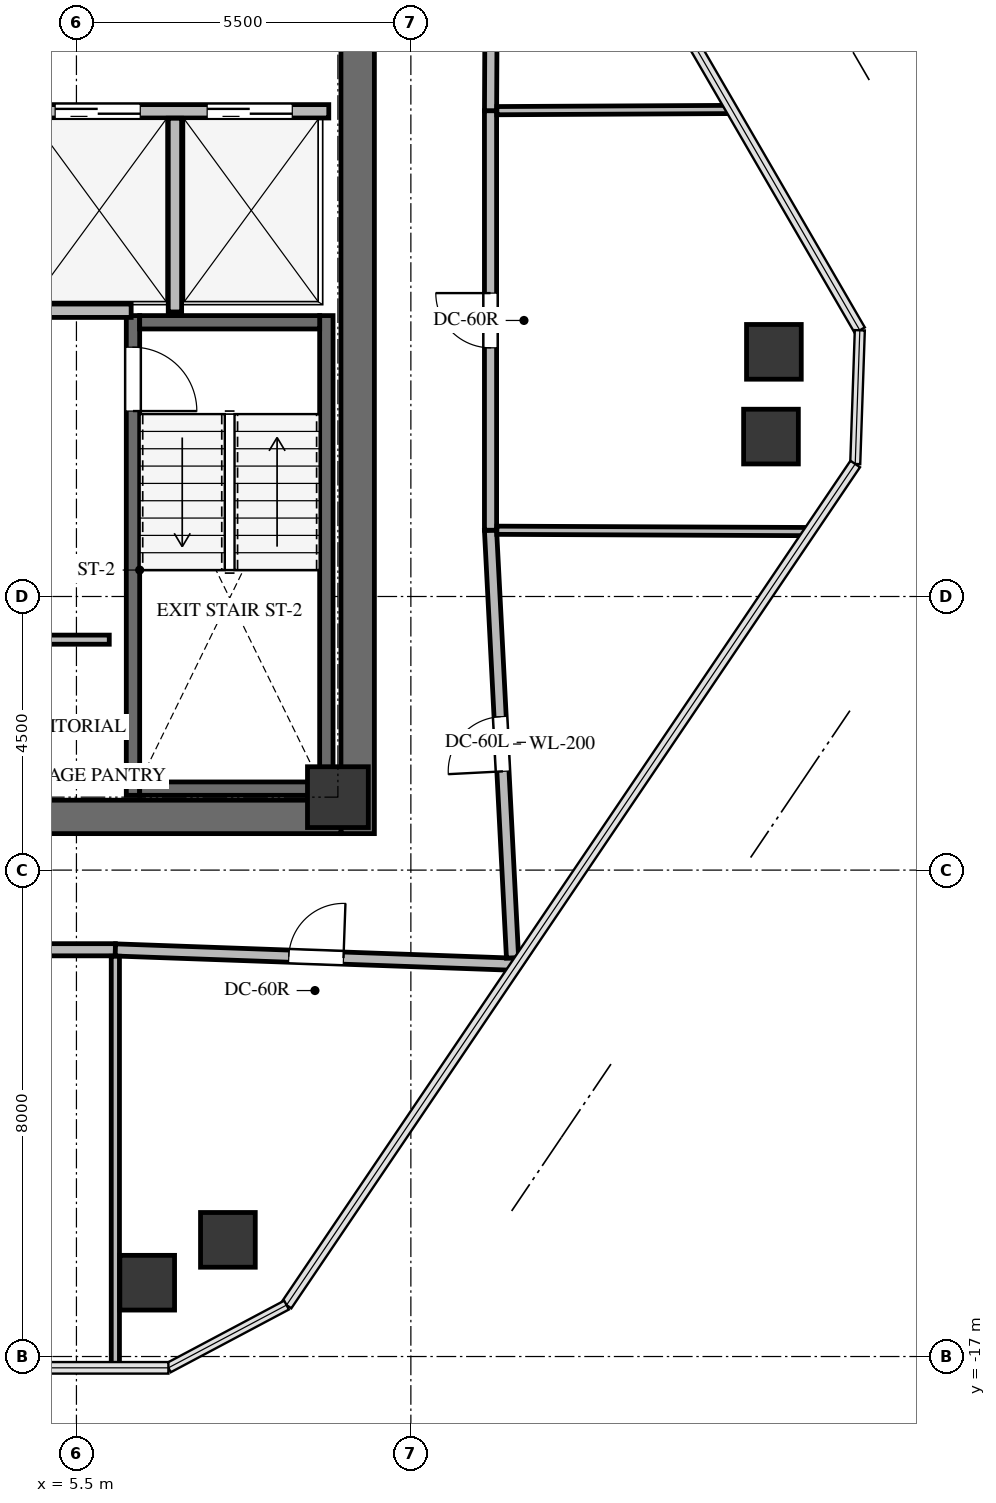
"""IFC4 building model, lengths in metres.
Left out: names, types, materials, properties, quantities, classifications, styles, units other than length and angle.
Written with IfcOpenShell. Run it as: python <this file> out.ifc"""

import sys

from ifc_helpers import new_model, si_unit, direction, frame, frame_2d, origin, origin_2d, place, context, subcontext, project, spatial, rectangle, extrude, source, transform, mapped, element, fill, save


model = new_model("IFC4")
c1 = context("Model", 3, precision=1e-05, world=origin(), true_north=direction((0.0, 1.0)))
c2 = subcontext(c1, "Body", "Model", "MODEL_VIEW")
j1 = project(units=[si_unit("LENGTHUNIT", "METRE"), si_unit("PLANEANGLEUNIT", "RADIAN")], contexts=[c1])
p1 = place(None, origin())
s1 = spatial("IfcSite", under=j1, at=p1, CompositionType="ELEMENT")
p2 = place(p1, origin())
s2 = spatial("IfcBuilding", under=s1, at=p2, CompositionType="ELEMENT")
p3 = place(p2, frame((0.0, 0.0, 264.9)))
s3 = spatial("IfcBuildingStorey", under=s2, at=p3, CompositionType="ELEMENT", Elevation=264.9)
p4 = place(p3, frame((10.125, -8.4, 0.0), z_axis=(0.0, 0.0, 1.0), x_axis=(0.0, 1.0, 0.0)))
e1 = element("IfcWall", 1, at=p4, inside=s3, PredefinedType="SHEAR", context=c2, shape_type="SweptSolid", body=[
    extrude(rectangle(XDim=16.8, YDim=0.55, at=frame_2d((8.4, 0.0))), origin(), (0.0, 0.0, 1.0), 3.4),
])
p5 = place(p3, frame((2.1, -8.125, 0.0), z_axis=(0.0, 0.0, 1.0), x_axis=(1.0, 0.0, 0.0)))
e2 = element("IfcWall", 2, at=p5, inside=s3, PredefinedType="SHEAR", context=c2, shape_type="SweptSolid", body=[
    extrude(rectangle(XDim=7.75, YDim=0.55, at=frame_2d((3.875, 0.0))), origin(), (0.0, 0.0, 1.0), 3.4),
])
p6 = place(p3, frame((9.61, -7.77, -0.3), z_axis=(0.0, 0.0, 1.0), x_axis=(0.0, 1.0, 0.0)))
e3 = element("IfcWall", 3, at=p6, inside=s3, PredefinedType="SHEAR", context=c2, shape_type="SweptSolid", body=[
    extrude(rectangle(XDim=7.89, YDim=0.22, at=frame_2d((3.945, 0.0))), origin(), (0.0, 0.0, 1.0), 3.4),
])
p7 = place(p3, frame((6.43, 0.12, -0.3), z_axis=(0.0, 0.0, 1.0), x_axis=(0.0, -1.0, 0.0)))
e4 = element("IfcWall", 4, at=p7, inside=s3, PredefinedType="SHEAR", context=c2, shape_type="SweptSolid", body=[
    extrude(rectangle(XDim=7.89, YDim=0.22, at=frame_2d((3.945, 0.0))), origin(), (0.0, 0.0, 1.0), 3.4),
])
p8 = place(p7, frame((0.52, 0.0, 0.0)))
e5 = element("IfcOpeningElement", 5, at=p8, cuts=e4, PredefinedType="OPENING", context=c2, shape_type="SweptSolid", body=[
    extrude(rectangle(XDim=1.05, YDim=2.15, at=frame_2d((0.525, 1.075))), frame((0.0, 0.12, 0.0), z_axis=(0.0, -1.0, 0.0), x_axis=(1.0, 0.0, 0.0)), (0.0, 0.0, 1.0), 0.24),
])
for number, where, z_axis, x_axis in (
    (6, (6.54, -7.66, -0.3), (0.0, 0.0, 1.0), (1.0, 0.0, 0.0)),
    (7, (9.5, 0.01, -0.3), (0.0, 0.0, 1.0), (-1.0, 0.0, 0.0)),
):
    element("IfcWall", number, at=place(p3, frame(where, z_axis=z_axis, x_axis=x_axis)), inside=s3, PredefinedType="SHEAR", context=c2, shape_type="SweptSolid", body=[
        extrude(rectangle(XDim=2.96, YDim=0.22, at=frame_2d((1.48, 0.0))), origin(), (0.0, 0.0, 1.0), 3.4),
    ])
m1 = source(origin(), c2, "Body", "SweptSolid", [
    extrude(rectangle(XDim=1.0, YDim=1.0, at=origin_2d()), origin(), (0.0, 0.0, 1.0), 3.4),
])
p9 = place(p3, frame((9.8, -7.8, -0.3), z_axis=(0.0, 0.0, 1.0), x_axis=(1.0, 0.0, 0.0)))
e8 = element("IfcColumn", 8, at=p9, inside=s3, PredefinedType="COLUMN", context=c2, shape_type="MappedRepresentation", body=[
    mapped(m1, transform((0.0, 0.0, 0.0), x_axis=(1.0, 0.0, 0.0), y_axis=(0.0, 1.0, 0.0), z_axis=(0.0, 0.0, 1.0), scale=1.0)),
])
m2 = source(origin(), c2, "Body", "SweptSolid", [
    extrude(rectangle(XDim=0.9, YDim=0.9, at=origin_2d()), origin(), (0.0, 0.0, 1.0), 3.4),
])
for number, where, z_axis, x_axis in (
    (9, (16.97, -0.476, -0.3), (0.0, 0.0, 1.0), (1.0, 0.0, 0.0)),
    (10, (16.922, -1.87, -0.3), (0.0, 0.0, 1.0), (1.0, 0.0, 0.0)),
    (11, (7.991, -15.081, -0.3), (0.0, 0.0, 1.0), (1.0, 0.0, 0.0)),
    (12, (6.664, -15.786, -0.3), (0.0, 0.0, 1.0), (1.0, 0.0, 0.0)),
):
    element("IfcColumn", number, at=place(p3, frame(where, z_axis=z_axis, x_axis=x_axis)), inside=s3, PredefinedType="COLUMN", context=c2, shape_type="MappedRepresentation", body=[
        mapped(m2, transform((0.0, 0.0, 0.0), x_axis=(1.0, 0.0, 0.0), y_axis=(0.0, 1.0, 0.0), z_axis=(0.0, 0.0, 1.0), scale=1.0)),
    ])
p10 = place(p3, frame((4.6, 3.48, 0.0), z_axis=(0.0, 0.0, 1.0), x_axis=(1.0, 0.0, 0.0)))
e13 = element("IfcWall", 13, at=p10, inside=s3, PredefinedType="SOLIDWALL", context=c2, shape_type="SweptSolid", body=[
    extrude(rectangle(XDim=5.05, YDim=0.22, at=frame_2d((2.525, 0.0))), origin(), (0.0, 0.0, 1.0), 3.085),
])
p11 = place(p10, frame((0.55, 0.0, 0.0)))
e14 = element("IfcOpeningElement", 14, at=p11, cuts=e13, PredefinedType="OPENING", context=c2, shape_type="SweptSolid", body=[
    extrude(rectangle(XDim=1.4, YDim=2.15, at=frame_2d((0.7, 1.075))), frame((0.0, 0.12, 0.0), z_axis=(0.0, -1.0, 0.0), x_axis=(1.0, 0.0, 0.0)), (0.0, 0.0, 1.0), 0.24),
])
p12 = place(p10, frame((3.05, 0.0, 0.0)))
e15 = element("IfcOpeningElement", 15, at=p12, cuts=e13, PredefinedType="OPENING", context=c2, shape_type="SweptSolid", body=[
    extrude(rectangle(XDim=1.4, YDim=2.15, at=frame_2d((0.7, 1.075))), frame((0.0, 0.12, 0.0), z_axis=(0.0, -1.0, 0.0), x_axis=(1.0, 0.0, 0.0)), (0.0, 0.0, 1.0), 0.24),
])
p13 = place(p3, frame((7.12, 0.18, 0.0), z_axis=(0.0, 0.0, 1.0), x_axis=(0.0, 1.0, 0.0)))
e16 = element("IfcWall", 16, at=p13, inside=s3, PredefinedType="SOLIDWALL", context=c2, shape_type="SweptSolid", body=[
    extrude(rectangle(XDim=3.186, YDim=0.22, at=frame_2d((1.593, 0.0))), origin(), (0.0, 0.0, 1.0), 3.085),
])
p14 = place(p3, frame((4.734, 0.2, 0.0), z_axis=(0.0, 0.0, 1.0), x_axis=(1.0, 0.0, 0.0)))
e17 = element("IfcWall", 17, at=p14, inside=s3, PredefinedType="SOLIDWALL", context=c2, shape_type="SweptSolid", body=[
    extrude(rectangle(XDim=1.666, YDim=0.22, at=frame_2d((0.833, 0.0))), origin(), (0.0, 0.0, 1.0), 3.085),
])
p15 = place(p3, frame((2.51, -5.21, 0.0), z_axis=(0.0, 0.0, 1.0), x_axis=(1.0, 0.0, 0.0)))
e18 = element("IfcWall", 18, at=p15, inside=s3, PredefinedType="PARTITIONING", context=c2, shape_type="SweptSolid", body=[
    extrude(rectangle(XDim=3.53, YDim=0.15, at=frame_2d((1.765, 0.0))), origin(), (0.0, 0.0, 1.0), 3.085),
])
p16 = place(p15, frame((1.315, 0.0, 0.0)))
e19 = element("IfcOpeningElement", 19, at=p16, cuts=e18, PredefinedType="OPENING", context=c2, shape_type="SweptSolid", body=[
    extrude(rectangle(XDim=0.9, YDim=2.05, at=frame_2d((0.45, 1.025))), frame((0.0, 0.085, 0.0), z_axis=(0.0, -1.0, 0.0), x_axis=(1.0, 0.0, 0.0)), (0.0, 0.0, 1.0), 0.17),
])
p17 = place(p3, frame((0.04, -10.31, 0.0), z_axis=(0.0, 0.0, 1.0), x_axis=(1.0, 0.0, 0.0)))
e20 = element("IfcWall", 20, at=p17, inside=s3, PredefinedType="SOLIDWALL", context=c2, shape_type="SweptSolid", body=[
    extrude(rectangle(XDim=6.1, YDim=0.2, at=frame_2d((3.05, 0.0))), origin(), (0.0, 0.0, 1.0), 2.342),
])
p18 = place(p17, frame((2.6, 0.0, 0.0)))
e21 = element("IfcOpeningElement", 21, at=p18, cuts=e20, PredefinedType="OPENING", context=c2, shape_type="SweptSolid", body=[
    extrude(rectangle(XDim=0.9, YDim=2.05, at=frame_2d((0.45, 1.025))), frame((0.0, 0.11, 0.0), z_axis=(0.0, -1.0, 0.0), x_axis=(1.0, 0.0, 0.0)), (0.0, 0.0, 1.0), 0.22),
])
p19 = place(p3, frame((6.14, -10.313, 0.0), z_axis=(0.0, 0.0, 1.0), x_axis=(0.999359083983, -0.035796944861, 0.0)))
e22 = element("IfcWall", 22, at=p19, inside=s3, PredefinedType="SOLIDWALL", context=c2, shape_type="SweptSolid", body=[
    extrude(rectangle(XDim=6.609, YDim=0.2, at=frame_2d((3.304, 0.0))), origin(), (0.0, 0.0, 1.0), 2.439),
])
p20 = place(p19, frame((2.854, 0.0, 0.0)))
e23 = element("IfcOpeningElement", 23, at=p20, cuts=e22, PredefinedType="OPENING", context=c2, shape_type="SweptSolid", body=[
    extrude(rectangle(XDim=0.9, YDim=2.05, at=frame_2d((0.45, 1.025))), frame((0.0, 0.11, 0.0), z_axis=(0.0, -1.0, 0.0), x_axis=(1.0, 0.0, 0.0)), (0.0, 0.0, 1.0), 0.22),
])
p21 = place(p3, frame((12.672, -10.443, 0.0), z_axis=(0.0, 0.0, 1.0), x_axis=(-0.051412460162, 0.998677504974, 0.0)))
e24 = element("IfcWall", 24, at=p21, inside=s3, PredefinedType="SOLIDWALL", context=c2, shape_type="SweptSolid", body=[
    extrude(rectangle(XDim=7.042, YDim=0.2, at=frame_2d((3.521, 0.0))), origin(), (0.0, 0.0, 1.0), 2.439),
])
p22 = place(p21, frame((3.071, 0.0, 0.0)))
e25 = element("IfcOpeningElement", 25, at=p22, cuts=e24, PredefinedType="OPENING", context=c2, shape_type="SweptSolid", body=[
    extrude(rectangle(XDim=0.9, YDim=2.05, at=frame_2d((0.45, 1.025))), frame((0.0, 0.11, 0.0), z_axis=(0.0, -1.0, 0.0), x_axis=(1.0, 0.0, 0.0)), (0.0, 0.0, 1.0), 0.22),
])
p23 = place(p3, frame((12.31, -3.41, 0.0), z_axis=(0.0, 0.0, 1.0), x_axis=(0.0, 1.0, 0.0)))
e26 = element("IfcWall", 26, at=p23, inside=s3, PredefinedType="SOLIDWALL", context=c2, shape_type="SweptSolid", body=[
    extrude(rectangle(XDim=6.9, YDim=0.2, at=frame_2d((3.45, 0.0))), origin(), (0.0, 0.0, 1.0), 2.342),
])
p24 = place(p23, frame((3.0, 0.0, 0.0)))
e27 = element("IfcOpeningElement", 27, at=p24, cuts=e26, PredefinedType="OPENING", context=c2, shape_type="SweptSolid", body=[
    extrude(rectangle(XDim=0.9, YDim=2.05, at=frame_2d((0.45, 1.025))), frame((0.0, 0.11, 0.0), z_axis=(0.0, -1.0, 0.0), x_axis=(1.0, 0.0, 0.0)), (0.0, 0.0, 1.0), 0.22),
])
p25 = place(p3, frame((12.31, 3.49, 0.0), z_axis=(0.0, 0.0, 1.0), x_axis=(0.005031021246, 0.999987344333, 0.0)))
e28 = element("IfcWall", 28, at=p25, inside=s3, PredefinedType="SOLIDWALL", context=c2, shape_type="SweptSolid", body=[
    extrude(rectangle(XDim=6.794, YDim=0.2, at=frame_2d((3.397, 0.0))), origin(), (0.0, 0.0, 1.0), 2.439),
])
p26 = place(p25, frame((2.947, 0.0, 0.0)))
e29 = element("IfcOpeningElement", 29, at=p26, cuts=e28, PredefinedType="OPENING", context=c2, shape_type="SweptSolid", body=[
    extrude(rectangle(XDim=0.9, YDim=2.05, at=frame_2d((0.45, 1.025))), frame((0.0, 0.11, 0.0), z_axis=(0.0, -1.0, 0.0), x_axis=(1.0, 0.0, 0.0)), (0.0, 0.0, 1.0), 0.22),
])
p27 = place(p3, frame((6.14, -10.417, 0.0), z_axis=(0.0, 0.0, 1.0), x_axis=(0.0, -1.0, 0.0)))
e30 = element("IfcWall", 30, at=p27, inside=s3, PredefinedType="PARTITIONING", context=c2, shape_type="SweptSolid", body=[
    extrude(rectangle(XDim=6.769, YDim=0.135, at=frame_2d((3.385, 0.0))), origin(), (0.0, 0.0, 1.0), 2.342),
])
p28 = place(p3, frame((12.744, -10.55, 0.0), z_axis=(0.0, 0.0, 1.0), x_axis=(0.56006489544, 0.828448738846, 0.0)))
e31 = element("IfcWall", 31, at=p28, inside=s3, PredefinedType="PARTITIONING", context=c2, shape_type="SweptSolid", body=[
    extrude(rectangle(XDim=0.262, YDim=0.135, at=frame_2d((0.131, 0.0))), origin(), (0.0, 0.0, 1.0), 3.085),
])
p29 = place(p3, frame((12.414, -3.41, 0.0), z_axis=(0.0, 0.0, 1.0), x_axis=(0.999990868706, -0.004273465251, 0.0)))
e32 = element("IfcWall", 32, at=p29, inside=s3, PredefinedType="PARTITIONING", context=c2, shape_type="SweptSolid", body=[
    extrude(rectangle(XDim=5.142, YDim=0.135, at=frame_2d((2.571, 0.0))), origin(), (0.0, 0.0, 1.0), 2.439),
])
p30 = place(p3, frame((12.414, 3.49, 0.0), z_axis=(0.0, 0.0, 1.0), x_axis=(0.999987207709, 0.005058104237, 0.0)))
e33 = element("IfcWall", 33, at=p30, inside=s3, PredefinedType="PARTITIONING", context=c2, shape_type="SweptSolid", body=[
    extrude(rectangle(XDim=3.861, YDim=0.135, at=frame_2d((1.931, 0.0))), origin(), (0.0, 0.0, 1.0), 2.439),
])
m3 = source(origin(), c2, "Body", "SweptSolid", [
    extrude(rectangle(XDim=1.05, YDim=2.15, at=frame_2d((0.525, 1.075))), frame((0.0, 0.025, 0.0), z_axis=(0.0, -1.0, 0.0), x_axis=(1.0, 0.0, 0.0)), (0.0, 0.0, 1.0), 0.05),
])
p31 = place(p8, origin())
e34 = element("IfcDoor", 34, at=p31, inside=s3, OperationType="SINGLE_SWING_RIGHT", PredefinedType="DOOR", context=c2, shape_type="MappedRepresentation", body=[
    mapped(m3, transform((0.0, 0.0, 0.0), x_axis=(1.0, 0.0, 0.0), y_axis=(0.0, 1.0, 0.0), z_axis=(0.0, 0.0, 1.0), scale=1.0)),
])
fill(e5, e34)
m4 = source(origin(), c2, "Body", "SweptSolid", [
    extrude(rectangle(XDim=1.4, YDim=2.15, at=frame_2d((0.7, 1.075))), frame((0.0, 0.025, 0.0), z_axis=(0.0, -1.0, 0.0), x_axis=(1.0, 0.0, 0.0)), (0.0, 0.0, 1.0), 0.05),
])
p32 = place(p11, origin())
e35 = element("IfcDoor", 35, at=p32, inside=s3, OperationType="DOUBLE_DOOR_SLIDING", PredefinedType="DOOR", context=c2, shape_type="MappedRepresentation", body=[
    mapped(m4, transform((0.0, 0.0, 0.0), x_axis=(1.0, 0.0, 0.0), y_axis=(0.0, 1.0, 0.0), z_axis=(0.0, 0.0, 1.0), scale=1.0)),
])
fill(e14, e35)
p33 = place(p12, origin())
e36 = element("IfcDoor", 36, at=p33, inside=s3, OperationType="DOUBLE_DOOR_SLIDING", PredefinedType="DOOR", context=c2, shape_type="MappedRepresentation", body=[
    mapped(m4, transform((0.0, 0.0, 0.0), x_axis=(1.0, 0.0, 0.0), y_axis=(0.0, 1.0, 0.0), z_axis=(0.0, 0.0, 1.0), scale=1.0)),
])
fill(e15, e36)
m5 = source(origin(), c2, "Body", "SweptSolid", [
    extrude(rectangle(XDim=0.9, YDim=2.05, at=frame_2d((0.45, 1.025))), frame((0.0, 0.025, 0.0), z_axis=(0.0, -1.0, 0.0), x_axis=(1.0, 0.0, 0.0)), (0.0, 0.0, 1.0), 0.05),
])
p34 = place(p20, origin())
e37 = element("IfcDoor", 37, at=p34, inside=s3, OperationType="SINGLE_SWING_RIGHT", PredefinedType="DOOR", context=c2, shape_type="MappedRepresentation", body=[
    mapped(m5, transform((0.0, 0.0, 0.0), x_axis=(1.0, 0.0, 0.0), y_axis=(0.0, 1.0, 0.0), z_axis=(0.0, 0.0, 1.0), scale=1.0)),
])
fill(e23, e37)
m6 = source(origin(), c2, "Body", "SweptSolid", [
    extrude(rectangle(XDim=0.9, YDim=2.05, at=frame_2d((0.45, 1.025))), frame((0.0, 0.025, 0.0), z_axis=(0.0, -1.0, 0.0), x_axis=(1.0, 0.0, 0.0)), (0.0, 0.0, 1.0), 0.05),
])
p35 = place(p22, origin())
e38 = element("IfcDoor", 38, at=p35, inside=s3, OperationType="SINGLE_SWING_LEFT", PredefinedType="DOOR", context=c2, shape_type="MappedRepresentation", body=[
    mapped(m6, transform((0.0, 0.0, 0.0), x_axis=(1.0, 0.0, 0.0), y_axis=(0.0, 1.0, 0.0), z_axis=(0.0, 0.0, 1.0), scale=1.0)),
])
fill(e25, e38)
p36 = place(p24, origin())
e39 = element("IfcDoor", 39, at=p36, inside=s3, OperationType="SINGLE_SWING_RIGHT", PredefinedType="DOOR", context=c2, shape_type="MappedRepresentation", body=[
    mapped(m5, transform((0.0, 0.0, 0.0), x_axis=(1.0, 0.0, 0.0), y_axis=(0.0, 1.0, 0.0), z_axis=(0.0, 0.0, 1.0), scale=1.0)),
])
fill(e27, e39)
save(model, sys.argv[1])
